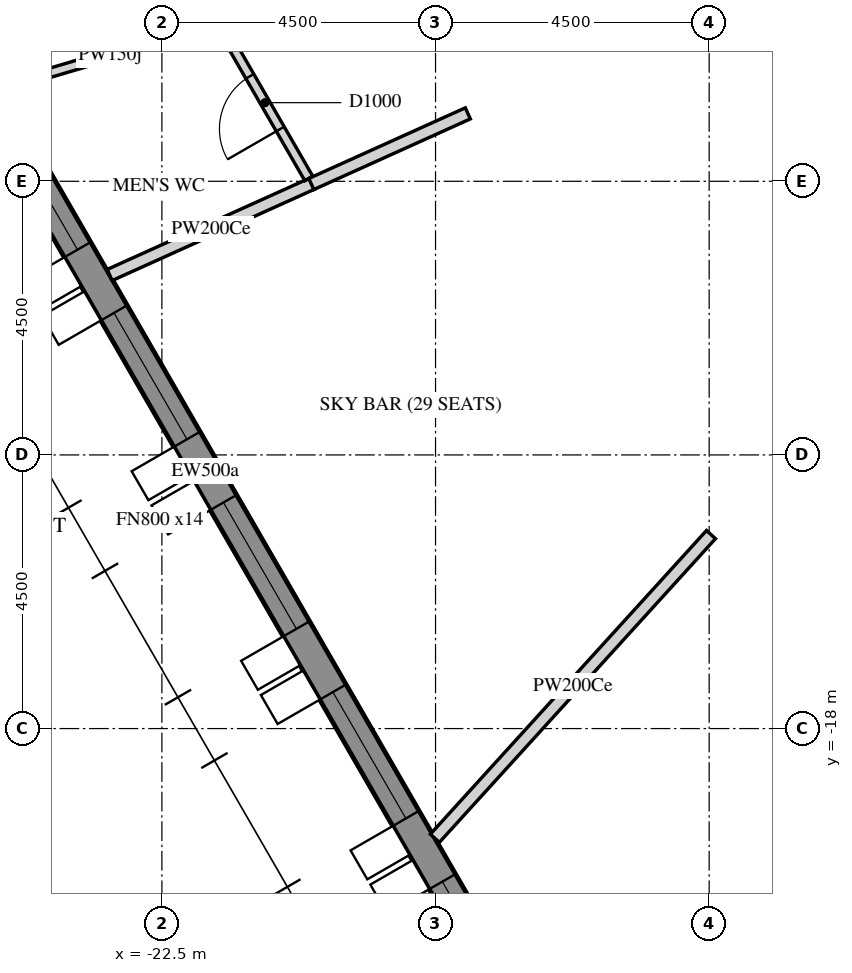
"""IFC4 building model, lengths in metres.
Left out: names, types, materials, properties, quantities, classifications, styles, units other than length and angle.
Written with IfcOpenShell. Run it as: python <this file> out.ifc"""

import sys

from ifc_helpers import new_model, si_unit, direction, frame, frame_2d, origin, place, context, subcontext, project, spatial, polyline, rectangle, outline, extrude, element, fill, save


model = new_model("IFC4")
c1 = context("Model", 3, precision=1e-05, world=origin(), true_north=direction((0.0, 1.0)))
c2 = subcontext(c1, "Body", "Model", "MODEL_VIEW")
j1 = project(units=[si_unit("LENGTHUNIT", "METRE"), si_unit("PLANEANGLEUNIT", "RADIAN")], contexts=[c1])
p1 = place(None, origin())
s1 = spatial("IfcSite", under=j1, at=p1, CompositionType="ELEMENT")
p2 = place(p1, origin())
s2 = spatial("IfcBuilding", under=s1, at=p2, CompositionType="ELEMENT")
p3 = place(p2, frame((0.0, 0.0, 338.1)))
s3 = spatial("IfcBuildingStorey", under=s2, at=p3, CompositionType="ELEMENT", Elevation=338.1)
p4 = place(p3, frame((-28.149, -2.745, -0.3), z_axis=(0.0, 0.0, 1.0), x_axis=(0.500003737743, -0.866023245787, 0.0)))
e1 = element("IfcWall", 1, at=p4, inside=s3, PredefinedType="SOLIDWALL", context=c2, shape_type="SweptSolid", body=[
    extrude(outline(polyline([(-0.021, -0.25), (25.468, -0.25), (25.421, 0.25), (0.021, 0.25), (-0.021, -0.25)])), origin(), (0.0, 0.0, 1.0), 5.4),
])
p5 = place(p4, frame((2.522, 0.0, 1.2)))
e2 = element("IfcOpeningElement", 2, at=p5, cuts=e1, PredefinedType="OPENING", context=c2, shape_type="SweptSolid", body=[
    extrude(rectangle(XDim=2.4, YDim=3.6, at=frame_2d((1.2, 1.8))), frame((0.0, 0.26, 0.0), z_axis=(0.0, -1.0, 0.0), x_axis=(1.0, 0.0, 0.0)), (0.0, 0.0, 1.0), 0.52),
])
p6 = place(p4, frame((6.122, 0.0, 1.2)))
e3 = element("IfcOpeningElement", 3, at=p6, cuts=e1, PredefinedType="OPENING", context=c2, shape_type="SweptSolid", body=[
    extrude(rectangle(XDim=2.4, YDim=3.6, at=frame_2d((1.2, 1.8))), frame((0.0, 0.26, 0.0), z_axis=(0.0, -1.0, 0.0), x_axis=(1.0, 0.0, 0.0)), (0.0, 0.0, 1.0), 0.52),
])
p7 = place(p4, frame((9.722, 0.0, 1.2)))
e4 = element("IfcOpeningElement", 4, at=p7, cuts=e1, PredefinedType="OPENING", context=c2, shape_type="SweptSolid", body=[
    extrude(rectangle(XDim=2.4, YDim=3.6, at=frame_2d((1.2, 1.8))), frame((0.0, 0.26, 0.0), z_axis=(0.0, -1.0, 0.0), x_axis=(1.0, 0.0, 0.0)), (0.0, 0.0, 1.0), 0.52),
])
p8 = place(p4, frame((13.323, 0.0, 1.2)))
e5 = element("IfcOpeningElement", 5, at=p8, cuts=e1, PredefinedType="OPENING", context=c2, shape_type="SweptSolid", body=[
    extrude(rectangle(XDim=2.4, YDim=3.6, at=frame_2d((1.2, 1.8))), frame((0.0, 0.26, 0.0), z_axis=(0.0, -1.0, 0.0), x_axis=(1.0, 0.0, 0.0)), (0.0, 0.0, 1.0), 0.52),
])
p9 = place(p4, frame((16.922, 0.0, 1.2)))
e6 = element("IfcOpeningElement", 6, at=p9, cuts=e1, PredefinedType="OPENING", context=c2, shape_type="SweptSolid", body=[
    extrude(rectangle(XDim=2.4, YDim=3.6, at=frame_2d((1.2, 1.8))), frame((0.0, 0.26, 0.0), z_axis=(0.0, -1.0, 0.0), x_axis=(1.0, 0.0, 0.0)), (0.0, 0.0, 1.0), 0.52),
])
p10 = place(p4, frame((20.522, 0.0, 1.2)))
e7 = element("IfcOpeningElement", 7, at=p10, cuts=e1, PredefinedType="OPENING", context=c2, shape_type="SweptSolid", body=[
    extrude(rectangle(XDim=2.4, YDim=3.6, at=frame_2d((1.2, 1.8))), frame((0.0, 0.26, 0.0), z_axis=(0.0, -1.0, 0.0), x_axis=(1.0, 0.0, 0.0)), (0.0, 0.0, 1.0), 0.52),
])
p11 = place(p3, frame((-12.471, 0.0, -0.3), z_axis=(0.0, 0.0, 1.0), x_axis=(0.499996419489, -0.866027470984, 0.0)))
e8 = element("IfcWall", 8, at=p11, inside=s3, PredefinedType="SHEAR", context=c2, shape_type="SweptSolid", body=[
    extrude(outline(polyline([(-0.115, -0.2), (12.586, -0.2), (12.355, 0.2), (0.115, 0.2), (-0.115, -0.2)])), origin(), (0.0, 0.0, 1.0), 5.4),
])
p12 = place(p11, frame((5.306, 0.0, 0.3)))
e9 = element("IfcOpeningElement", 9, at=p12, cuts=e8, PredefinedType="OPENING", context=c2, shape_type="SweptSolid", body=[
    extrude(rectangle(XDim=1.8, YDim=2.4, at=frame_2d((0.9, 1.2))), frame((0.0, 0.21, 0.0), z_axis=(0.0, -1.0, 0.0), x_axis=(1.0, 0.0, 0.0)), (0.0, 0.0, 1.0), 0.42),
])
p13 = place(p3, frame((-25.141, -7.454, 0.0), z_axis=(0.0, 0.0, 1.0), x_axis=(0.958757197132, 0.28422638327, 0.0)))
e10 = element("IfcWall", 10, at=p13, inside=s3, PredefinedType="PARTITIONING", context=c2, shape_type="SweptSolid", body=[
    extrude(rectangle(XDim=3.733, YDim=0.15, at=frame_2d((1.867, 0.0))), origin(), (0.0, 0.0, 1.0), 4.346),
])
p14 = place(p3, frame((-23.359, -10.541, 0.0), z_axis=(0.0, 0.0, 1.0), x_axis=(0.91155143735, 0.41118606137, 0.0)))
e11 = element("IfcWall", 11, at=p14, inside=s3, PredefinedType="PARTITIONING", context=c2, shape_type="SweptSolid", body=[
    extrude(rectangle(XDim=3.657, YDim=0.2, at=frame_2d((1.829, 0.0))), origin(), (0.0, 0.0, 1.0), 4.346),
])
p15 = place(p3, frame((-20.084, -8.954, 0.0), z_axis=(0.0, 0.0, 1.0), x_axis=(-0.499795848753, 0.866143238483, 0.0)))
e12 = element("IfcWall", 12, at=p15, inside=s3, PredefinedType="PARTITIONING", context=c2, shape_type="SweptSolid", body=[
    extrude(rectangle(XDim=2.88, YDim=0.15, at=frame_2d((1.44, 0.0))), origin(), (0.0, 0.0, 1.0), 5.1),
])
p16 = place(p15, frame((0.94, 0.0, 0.0)))
e13 = element("IfcOpeningElement", 13, at=p16, cuts=e12, PredefinedType="OPENING", context=c2, shape_type="SweptSolid", body=[
    extrude(rectangle(XDim=1.0, YDim=2.1, at=frame_2d((0.5, 1.05))), frame((0.0, 0.085, 0.0), z_axis=(0.0, -1.0, 0.0), x_axis=(1.0, 0.0, 0.0)), (0.0, 0.0, 1.0), 0.17),
])
p17 = place(p3, frame((-20.043, -9.045, 0.0), z_axis=(0.0, 0.0, 1.0), x_axis=(0.911446947279, 0.411417625164, 0.0)))
e14 = element("IfcWall", 14, at=p17, inside=s3, PredefinedType="PARTITIONING", context=c2, shape_type="SweptSolid", body=[
    extrude(rectangle(XDim=2.824, YDim=0.2, at=frame_2d((1.412, 0.0))), origin(), (0.0, 0.0, 1.0), 4.346),
])
p18 = place(p3, frame((-18.011, -19.804, 0.0), z_axis=(0.0, 0.0, 1.0), x_axis=(0.672762804964, 0.739858235243, 0.0)))
e15 = element("IfcWall", 15, at=p18, inside=s3, PredefinedType="PARTITIONING", context=c2, shape_type="SweptSolid", body=[
    extrude(rectangle(XDim=6.75, YDim=0.2, at=frame_2d((3.375, 0.0))), origin(), (0.0, 0.0, 1.0), 4.346),
])
p19 = place(p6, frame((0.0, 0.18, 0.0)))
e16 = element("IfcWindow", 16, at=p19, inside=s3, PartitioningType="DOUBLE_PANEL_VERTICAL", PredefinedType="WINDOW", context=c2, shape_type="SweptSolid", body=[
    extrude(rectangle(XDim=2.4, YDim=3.6, at=frame_2d((1.2, 1.8))), frame((0.0, 0.03, 0.0), z_axis=(0.0, -1.0, 0.0), x_axis=(1.0, 0.0, 0.0)), (0.0, 0.0, 1.0), 0.06),
])
fill(e3, e16)
p20 = place(p7, frame((0.0, 0.18, 0.0)))
e17 = element("IfcWindow", 17, at=p20, inside=s3, PartitioningType="DOUBLE_PANEL_VERTICAL", PredefinedType="WINDOW", context=c2, shape_type="SweptSolid", body=[
    extrude(rectangle(XDim=2.4, YDim=3.6, at=frame_2d((1.2, 1.8))), frame((0.0, 0.03, 0.0), z_axis=(0.0, -1.0, 0.0), x_axis=(1.0, 0.0, 0.0)), (0.0, 0.0, 1.0), 0.06),
])
fill(e4, e17)
p21 = place(p8, frame((0.0, 0.18, 0.0)))
e18 = element("IfcWindow", 18, at=p21, inside=s3, PartitioningType="DOUBLE_PANEL_VERTICAL", PredefinedType="WINDOW", context=c2, shape_type="SweptSolid", body=[
    extrude(rectangle(XDim=2.4, YDim=3.6, at=frame_2d((1.2, 1.8))), frame((0.0, 0.03, 0.0), z_axis=(0.0, -1.0, 0.0), x_axis=(1.0, 0.0, 0.0)), (0.0, 0.0, 1.0), 0.06),
])
fill(e5, e18)
p22 = place(p9, frame((0.0, 0.18, 0.0)))
e19 = element("IfcWindow", 19, at=p22, inside=s3, PartitioningType="DOUBLE_PANEL_VERTICAL", PredefinedType="WINDOW", context=c2, shape_type="SweptSolid", body=[
    extrude(rectangle(XDim=2.4, YDim=3.6, at=frame_2d((1.2, 1.8))), frame((0.0, 0.03, 0.0), z_axis=(0.0, -1.0, 0.0), x_axis=(1.0, 0.0, 0.0)), (0.0, 0.0, 1.0), 0.06),
])
fill(e6, e19)
p23 = place(p10, frame((0.0, 0.18, 0.0)))
e20 = element("IfcWindow", 20, at=p23, inside=s3, PartitioningType="DOUBLE_PANEL_VERTICAL", PredefinedType="WINDOW", context=c2, shape_type="SweptSolid", body=[
    extrude(rectangle(XDim=2.4, YDim=3.6, at=frame_2d((1.2, 1.8))), frame((0.0, 0.03, 0.0), z_axis=(0.0, -1.0, 0.0), x_axis=(1.0, 0.0, 0.0)), (0.0, 0.0, 1.0), 0.06),
])
fill(e7, e20)
p24 = place(p16, origin())
e21 = element("IfcDoor", 21, at=p24, inside=s3, OperationType="SINGLE_SWING_LEFT", PredefinedType="DOOR", context=c2, shape_type="SweptSolid", body=[
    extrude(rectangle(XDim=1.0, YDim=2.1, at=frame_2d((0.5, 1.05))), frame((0.0, 0.025, 0.0), z_axis=(0.0, -1.0, 0.0), x_axis=(1.0, 0.0, 0.0)), (0.0, 0.0, 1.0), 0.05),
])
fill(e13, e21)
save(model, sys.argv[1])
